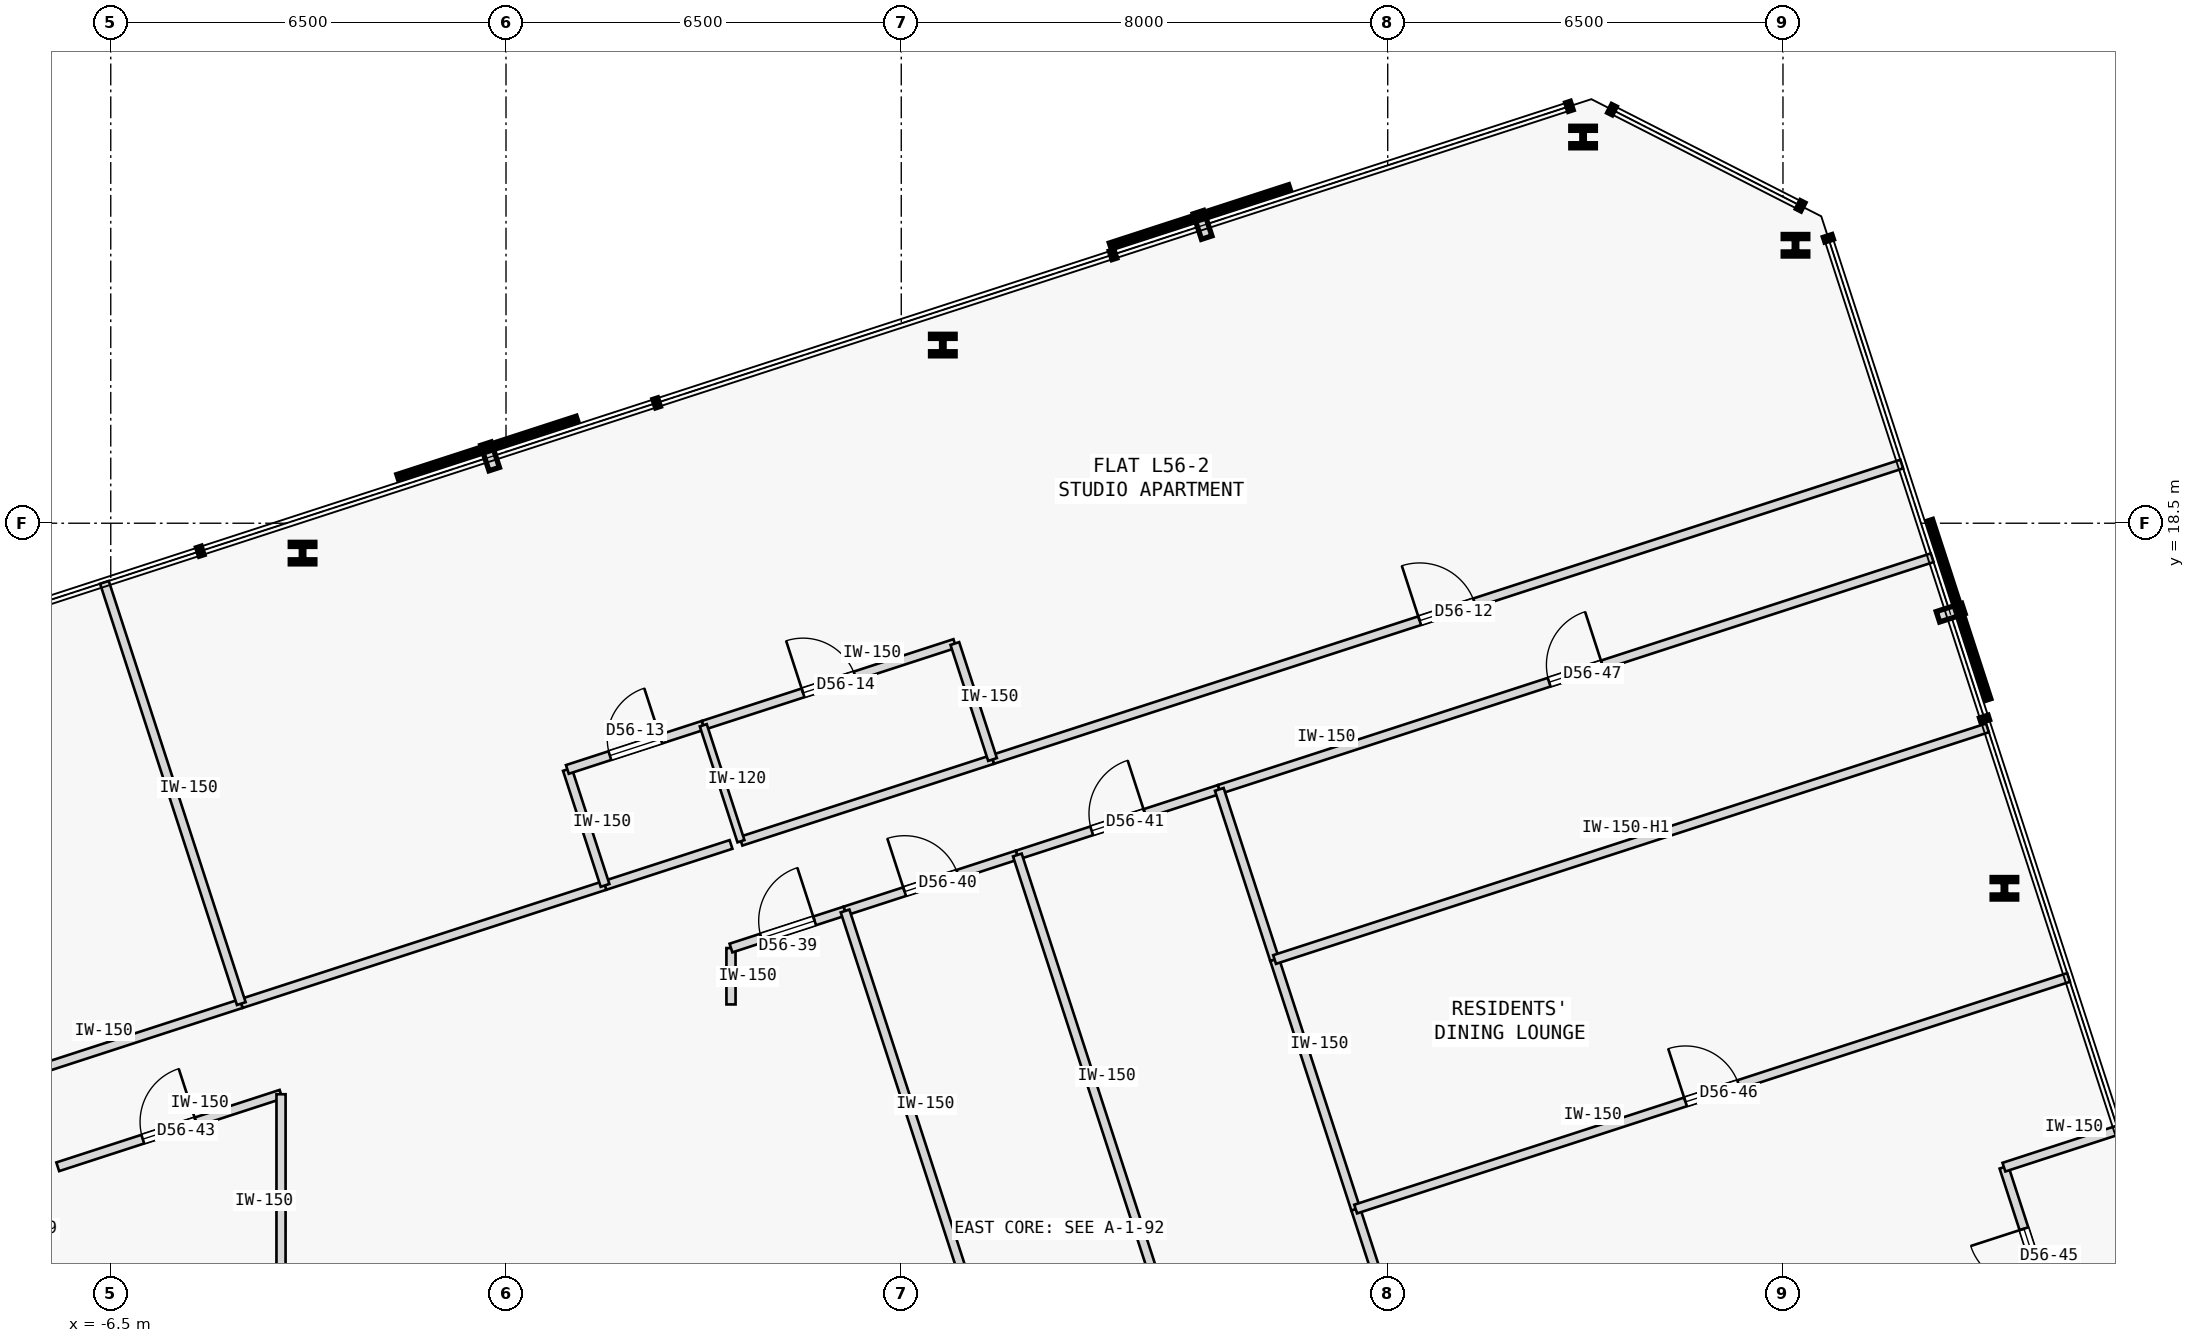
"""IFC4 building model, lengths in metres.
Left out: names, types, materials, properties, quantities, classifications, styles, units other than length and angle.
Written with IfcOpenShell. Run it as: python <this file> out.ifc"""

import sys

from ifc_helpers import new_model, si_unit, direction, frame, frame_2d, origin, origin_2d, place, context, subcontext, project, spatial, rectangle, i_section, extrude, element, fill, save


model = new_model("IFC4")
c1 = context("Model", 3, precision=1e-05, world=origin(), true_north=direction((0.0, 1.0)))
c2 = subcontext(c1, "Body", "Model", "MODEL_VIEW")
j1 = project(units=[si_unit("LENGTHUNIT", "METRE"), si_unit("PLANEANGLEUNIT", "RADIAN")], contexts=[c1])
p1 = place(None, origin())
s1 = spatial("IfcSite", under=j1, at=p1, CompositionType="ELEMENT")
p2 = place(p1, origin())
s2 = spatial("IfcBuilding", under=s1, at=p2, CompositionType="ELEMENT")
p3 = place(p2, frame((0.0, 0.0, 214.25)))
s3 = spatial("IfcBuildingStorey", under=s2, at=p3, CompositionType="ELEMENT", Elevation=214.25)
for number, where, z_axis, x_axis in (
    (1, (24.642, 12.497, 0.0), (0.0, 0.0, 1.0), (1.0, 0.0, 0.0)),
    (2, (21.206, 23.071, 0.0), (0.0, 0.0, 1.0), (1.0, 0.0, 0.0)),
    (3, (17.713, 24.851, 0.0), (0.0, 0.0, 1.0), (1.0, 0.0, 0.0)),
    (4, (7.184, 21.43, 0.0), (0.0, 0.0, 1.0), (1.0, 0.0, 0.0)),
    (5, (-3.346, 18.009, 0.0), (0.0, 0.0, 1.0), (1.0, 0.0, 0.0)),
):
    element("IfcColumn", number, at=place(p3, frame(where, z_axis=z_axis, x_axis=x_axis)), inside=s3, PredefinedType="COLUMN", context=c2, shape_type="SweptSolid", body=[
        extrude(i_section(OverallWidth=0.405, OverallDepth=0.355, WebThickness=0.042, FlangeThickness=0.068, FilletRadius=0.015, at=origin_2d()), origin(), (0.0, 0.0, 1.0), 3.35),
    ])
p4 = place(p3, frame((-22.586, 4.677, 0.0), z_axis=(0.0, 0.0, 1.0), x_axis=(0.951057743275, 0.309013218095, 0.0)))
e6 = element("IfcWall", 6, at=p4, inside=s3, PredefinedType="PARTITIONING", context=c2, shape_type="SweptSolid", body=[
    extrude(rectangle(XDim=19.171, YDim=0.15, at=frame_2d((9.585, 0.0))), origin(), (0.0, 0.0, 1.0), 3.125),
])
p5 = place(p4, frame((9.111, 0.0, 0.0)))
e7 = element("IfcOpeningElement", 7, at=p5, cuts=e6, PredefinedType="OPENING", context=c2, shape_type="SweptSolid", body=[
    extrude(rectangle(XDim=0.95, YDim=2.15, at=frame_2d((0.475, 1.075))), frame((0.0, 0.085, 0.0), z_axis=(0.0, -1.0, 0.0), x_axis=(1.0, 0.0, 0.0)), (0.0, 0.0, 1.0), 0.17),
])
p6 = place(p3, frame((-4.354, 10.601, 0.0), z_axis=(0.0, 0.0, 1.0), x_axis=(0.951050896078, 0.30903429109, 0.0)))
e8 = element("IfcWall", 8, at=p6, inside=s3, PredefinedType="PARTITIONING", context=c2, shape_type="SweptSolid", body=[
    extrude(rectangle(XDim=6.29, YDim=0.15, at=frame_2d((3.145, 0.0))), origin(), (0.0, 0.0, 1.0), 3.125),
])
p7 = place(p3, frame((8.001, 14.615, 0.0), z_axis=(0.0, 0.0, 1.0), x_axis=(0.951056661035, 0.309016548911, 0.0)))
e9 = element("IfcWall", 9, at=p7, inside=s3, PredefinedType="PARTITIONING", context=c2, shape_type="SweptSolid", body=[
    extrude(rectangle(XDim=15.722, YDim=0.15, at=frame_2d((7.861, 0.0))), origin(), (0.0, 0.0, 1.0), 3.125),
])
p8 = place(p7, frame((7.386, 0.0, 0.0)))
e10 = element("IfcOpeningElement", 10, at=p8, cuts=e9, PredefinedType="OPENING", context=c2, shape_type="SweptSolid", body=[
    extrude(rectangle(XDim=0.95, YDim=2.15, at=frame_2d((0.475, 1.075))), frame((0.0, 0.085, 0.0), z_axis=(0.0, -1.0, 0.0), x_axis=(1.0, 0.0, 0.0)), (0.0, 0.0, 1.0), 0.17),
])
p9 = place(p3, frame((1.629, 12.544, 0.0), z_axis=(0.0, 0.0, 1.0), x_axis=(0.951087596826, 0.308921321963, 0.0)))
e11 = element("IfcWall", 11, at=p9, inside=s3, PredefinedType="PARTITIONING", context=c2, shape_type="SweptSolid", body=[
    extrude(rectangle(XDim=2.178, YDim=0.15, at=frame_2d((1.089, 0.0))), origin(), (0.0, 0.0, 1.0), 3.125),
])
p10 = place(p3, frame((3.864, 13.271, 0.0), z_axis=(0.0, 0.0, 1.0), x_axis=(0.951052627573, 0.309028962374, 0.0)))
e12 = element("IfcWall", 12, at=p10, inside=s3, PredefinedType="PARTITIONING", context=c2, shape_type="SweptSolid", body=[
    extrude(rectangle(XDim=4.35, YDim=0.15, at=frame_2d((2.175, 0.0))), origin(), (0.0, 0.0, 1.0), 3.125),
])
p11 = place(p3, frame((3.7, 10.587, 0.0), z_axis=(0.0, 0.0, 1.0), x_axis=(-0.000789889169, 0.999999688038, 0.0)))
e13 = element("IfcWall", 13, at=p11, inside=s3, PredefinedType="PARTITIONING", context=c2, shape_type="SweptSolid", body=[
    extrude(rectangle(XDim=0.927, YDim=0.15, at=frame_2d((0.464, 0.0))), origin(), (0.0, 0.0, 1.0), 3.125),
])
p12 = place(p3, frame((3.699, 11.514, 0.0), z_axis=(0.0, 0.0, 1.0), x_axis=(0.951068617763, 0.308979747405, 0.0)))
e14 = element("IfcWall", 14, at=p12, inside=s3, PredefinedType="PARTITIONING", context=c2, shape_type="SweptSolid", body=[
    extrude(rectangle(XDim=1.973, YDim=0.15, at=frame_2d((0.986, 0.0))), origin(), (0.0, 0.0, 1.0), 3.125),
])
p13 = place(p12, frame((0.527, 0.0, 0.0)))
e15 = element("IfcOpeningElement", 15, at=p13, cuts=e14, PredefinedType="OPENING", context=c2, shape_type="SweptSolid", body=[
    extrude(rectangle(XDim=0.92, YDim=2.15, at=frame_2d((0.46, 1.075))), frame((0.0, 0.085, 0.0), z_axis=(0.0, -1.0, 0.0), x_axis=(1.0, 0.0, 0.0)), (0.0, 0.0, 1.0), 0.17),
])
p14 = place(p3, frame((5.576, 12.124, 0.0), z_axis=(0.0, 0.0, 1.0), x_axis=(0.951049123732, 0.309039745419, 0.0)))
e16 = element("IfcWall", 16, at=p14, inside=s3, PredefinedType="PARTITIONING", context=c2, shape_type="SweptSolid", body=[
    extrude(rectangle(XDim=2.979, YDim=0.15, at=frame_2d((1.49, 0.0))), origin(), (0.0, 0.0, 1.0), 3.125),
])
p15 = place(p14, frame((1.03, 0.0, 0.0)))
e17 = element("IfcOpeningElement", 17, at=p15, cuts=e16, PredefinedType="OPENING", context=c2, shape_type="SweptSolid", body=[
    extrude(rectangle(XDim=0.92, YDim=2.15, at=frame_2d((0.46, 1.075))), frame((0.0, 0.085, 0.0), z_axis=(0.0, -1.0, 0.0), x_axis=(1.0, 0.0, 0.0)), (0.0, 0.0, 1.0), 0.17),
])
p16 = place(p3, frame((8.409, 13.044, 0.0), z_axis=(0.0, 0.0, 1.0), x_axis=(0.951054104561, 0.309024416831, 0.0)))
e18 = element("IfcWall", 18, at=p16, inside=s3, PredefinedType="PARTITIONING", context=c2, shape_type="SweptSolid", body=[
    extrude(rectangle(XDim=3.492, YDim=0.15, at=frame_2d((1.746, 0.0))), origin(), (0.0, 0.0, 1.0), 3.125),
])
p17 = place(p16, frame((1.286, 0.0, 0.0)))
e19 = element("IfcOpeningElement", 19, at=p17, cuts=e18, PredefinedType="OPENING", context=c2, shape_type="SweptSolid", body=[
    extrude(rectangle(XDim=0.92, YDim=2.15, at=frame_2d((0.46, 1.075))), frame((0.0, 0.085, 0.0), z_axis=(0.0, -1.0, 0.0), x_axis=(1.0, 0.0, 0.0)), (0.0, 0.0, 1.0), 0.17),
])
p18 = place(p3, frame((-7.372, 7.917, 0.0), z_axis=(0.0, 0.0, 1.0), x_axis=(0.951052654993, 0.309028877989, 0.0)))
e20 = element("IfcWall", 20, at=p18, inside=s3, PredefinedType="PARTITIONING", context=c2, shape_type="SweptSolid", body=[
    extrude(rectangle(XDim=3.861, YDim=0.15, at=frame_2d((1.93, 0.0))), origin(), (0.0, 0.0, 1.0), 3.125),
])
p19 = place(p18, frame((1.47, 0.0, 0.0)))
e21 = element("IfcOpeningElement", 21, at=p19, cuts=e20, PredefinedType="OPENING", context=c2, shape_type="SweptSolid", body=[
    extrude(rectangle(XDim=0.92, YDim=2.15, at=frame_2d((0.46, 1.075))), frame((0.0, 0.085, 0.0), z_axis=(0.0, -1.0, 0.0), x_axis=(1.0, 0.0, 0.0)), (0.0, 0.0, 1.0), 0.17),
])
p20 = place(p3, frame((-3.7, 5.6, 0.0), z_axis=(0.0, 0.0, 1.0), x_axis=(0.000139120755, 0.999999990323, 0.0)))
e22 = element("IfcWall", 22, at=p20, inside=s3, PredefinedType="PARTITIONING", context=c2, shape_type="SweptSolid", body=[
    extrude(rectangle(XDim=3.51, YDim=0.15, at=frame_2d((1.755, 0.0))), origin(), (0.0, 0.0, 1.0), 3.125),
])
p21 = place(p3, frame((25.576, 5.011, 0.0), z_axis=(0.0, 0.0, 1.0), x_axis=(-0.309011835091, 0.951058192633, 0.0)))
e23 = element("IfcWall", 23, at=p21, inside=s3, PredefinedType="PARTITIONING", context=c2, shape_type="SweptSolid", body=[
    extrude(rectangle(XDim=3.049, YDim=0.15, at=frame_2d((1.524, 0.0))), origin(), (0.0, 0.0, 1.0), 3.125),
])
p22 = place(p21, frame((1.064, 0.0, 0.0)))
e24 = element("IfcOpeningElement", 24, at=p22, cuts=e23, PredefinedType="OPENING", context=c2, shape_type="SweptSolid", body=[
    extrude(rectangle(XDim=0.92, YDim=2.15, at=frame_2d((0.46, 1.075))), frame((0.0, 0.085, 0.0), z_axis=(0.0, -1.0, 0.0), x_axis=(1.0, 0.0, 0.0)), (0.0, 0.0, 1.0), 0.17),
])
p23 = place(p3, frame((24.634, 7.91, 0.0), z_axis=(0.0, 0.0, 1.0), x_axis=(0.951054051148, 0.309024581215, 0.0)))
e25 = element("IfcWall", 25, at=p23, inside=s3, PredefinedType="PARTITIONING", context=c2, shape_type="SweptSolid", body=[
    extrude(rectangle(XDim=1.975, YDim=0.15, at=frame_2d((0.988, 0.0))), origin(), (0.0, 0.0, 1.0), 3.125),
])
p24 = place(p3, frame((11.73, 14.123, 0.0), z_axis=(0.0, 0.0, 1.0), x_axis=(0.951060263663, 0.309005460926, 0.0)))
e26 = element("IfcWall", 26, at=p24, inside=s3, PredefinedType="PARTITIONING", context=c2, shape_type="SweptSolid", body=[
    extrude(rectangle(XDim=12.327, YDim=0.15, at=frame_2d((6.164, 0.0))), origin(), (0.0, 0.0, 1.0), 3.125),
])
p25 = place(p24, frame((5.704, 0.0, 0.0)))
e27 = element("IfcOpeningElement", 27, at=p25, cuts=e26, PredefinedType="OPENING", context=c2, shape_type="SweptSolid", body=[
    extrude(rectangle(XDim=0.92, YDim=2.15, at=frame_2d((0.46, 1.075))), frame((0.0, 0.085, 0.0), z_axis=(0.0, -1.0, 0.0), x_axis=(1.0, 0.0, 0.0)), (0.0, 0.0, 1.0), 0.17),
])
p26 = place(p3, frame((-4.354, 10.601, 0.0), z_axis=(0.0, 0.0, 1.0), x_axis=(-0.308989064099, 0.951065590939, 0.0)))
e28 = element("IfcWall", 28, at=p26, inside=s3, PredefinedType="PARTITIONING", context=c2, shape_type="SweptSolid", body=[
    extrude(rectangle(XDim=7.284, YDim=0.15, at=frame_2d((3.642, 0.0))), origin(), (0.0, 0.0, 1.0), 3.125),
])
p27 = place(p3, frame((1.629, 12.544, 0.0), z_axis=(0.0, 0.0, 1.0), x_axis=(-0.309022749039, 0.951054646472, 0.0)))
e29 = element("IfcWall", 29, at=p27, inside=s3, PredefinedType="PARTITIONING", context=c2, shape_type="SweptSolid", body=[
    extrude(rectangle(XDim=2.005, YDim=0.15, at=frame_2d((1.002, 0.0))), origin(), (0.0, 0.0, 1.0), 3.125),
])
p28 = place(p3, frame((1.009, 14.451, 0.0), z_axis=(0.0, 0.0, 1.0), x_axis=(0.951076048914, 0.308956872689, 0.0)))
e30 = element("IfcWall", 30, at=p28, inside=s3, PredefinedType="PARTITIONING", context=c2, shape_type="SweptSolid", body=[
    extrude(rectangle(XDim=2.35, YDim=0.15, at=frame_2d((1.175, 0.0))), origin(), (0.0, 0.0, 1.0), 3.125),
])
p29 = place(p28, frame((0.735, 0.0, 0.0)))
e31 = element("IfcOpeningElement", 31, at=p29, cuts=e30, PredefinedType="OPENING", context=c2, shape_type="SweptSolid", body=[
    extrude(rectangle(XDim=0.88, YDim=2.15, at=frame_2d((0.44, 1.075))), frame((0.0, 0.085, 0.0), z_axis=(0.0, -1.0, 0.0), x_axis=(1.0, 0.0, 0.0)), (0.0, 0.0, 1.0), 0.17),
])
p30 = place(p3, frame((3.244, 15.177, 0.0), z_axis=(0.0, 0.0, 1.0), x_axis=(0.951052627573, 0.309028962374, 0.0)))
e32 = element("IfcWall", 32, at=p30, inside=s3, PredefinedType="PARTITIONING", context=c2, shape_type="SweptSolid", body=[
    extrude(rectangle(XDim=4.35, YDim=0.15, at=frame_2d((2.175, 0.0))), origin(), (0.0, 0.0, 1.0), 3.125),
])
p31 = place(p30, frame((1.725, 0.0, 0.0)))
e33 = element("IfcOpeningElement", 33, at=p31, cuts=e32, PredefinedType="OPENING", context=c2, shape_type="SweptSolid", body=[
    extrude(rectangle(XDim=0.9, YDim=2.15, at=frame_2d((0.45, 1.075))), frame((0.0, 0.085, 0.0), z_axis=(0.0, -1.0, 0.0), x_axis=(1.0, 0.0, 0.0)), (0.0, 0.0, 1.0), 0.17),
])
p32 = place(p3, frame((8.001, 14.615, 0.0), z_axis=(0.0, 0.0, 1.0), x_axis=(-0.309022749039, 0.951054646472, 0.0)))
e34 = element("IfcWall", 34, at=p32, inside=s3, PredefinedType="PARTITIONING", context=c2, shape_type="SweptSolid", body=[
    extrude(rectangle(XDim=2.005, YDim=0.15, at=frame_2d((1.002, 0.0))), origin(), (0.0, 0.0, 1.0), 3.125),
])
p33 = place(p3, frame((3.864, 13.271, 0.0), z_axis=(0.0, 0.0, 1.0), x_axis=(-0.309022749039, 0.951054646472, 0.0)))
e35 = element("IfcWall", 35, at=p33, inside=s3, PredefinedType="PARTITIONING", context=c2, shape_type="SweptSolid", body=[
    extrude(rectangle(XDim=2.005, YDim=0.12, at=frame_2d((1.002, 0.0))), origin(), (0.0, 0.0, 1.0), 3.125),
])
p34 = place(p3, frame((7.696, 5.599, 0.0), z_axis=(0.0, 0.0, 1.0), x_axis=(-0.309022497646, 0.951054728157, 0.0)))
e36 = element("IfcWall", 36, at=p34, inside=s3, PredefinedType="PARTITIONING", context=c2, shape_type="SweptSolid", body=[
    extrude(rectangle(XDim=6.86, YDim=0.15, at=frame_2d((3.43, 0.0))), origin(), (0.0, 0.0, 1.0), 3.125),
])
p35 = place(p3, frame((10.828, 5.6, 0.0), z_axis=(0.0, 0.0, 1.0), x_axis=(-0.30901342663, 0.951057675519, 0.0)))
e37 = element("IfcWall", 37, at=p35, inside=s3, PredefinedType="PARTITIONING", context=c2, shape_type="SweptSolid", body=[
    extrude(rectangle(XDim=7.827, YDim=0.15, at=frame_2d((3.914, 0.0))), origin(), (0.0, 0.0, 1.0), 3.125),
])
p36 = place(p3, frame((14.5, 5.6, 0.0), z_axis=(0.0, 0.0, 1.0), x_axis=(-0.308872364299, 0.951103497298, 0.0)))
e38 = element("IfcWall", 38, at=p36, inside=s3, PredefinedType="PARTITIONING", context=c2, shape_type="SweptSolid", body=[
    extrude(rectangle(XDim=1.705, YDim=0.15, at=frame_2d((0.853, 0.0))), origin(), (0.0, 0.0, 1.0), 3.125),
])
p37 = place(p3, frame((13.973, 7.221, 0.0), z_axis=(0.0, 0.0, 1.0), x_axis=(-0.309038735568, 0.951049451879, 0.0)))
e39 = element("IfcWall", 39, at=p37, inside=s3, PredefinedType="PARTITIONING", context=c2, shape_type="SweptSolid", body=[
    extrude(rectangle(XDim=4.315, YDim=0.15, at=frame_2d((2.157, 0.0))), origin(), (0.0, 0.0, 1.0), 3.125),
])
p38 = place(p3, frame((12.639, 11.325, 0.0), z_axis=(0.0, 0.0, 1.0), x_axis=(-0.309024151982, 0.951054190618, 0.0)))
e40 = element("IfcWall", 40, at=p38, inside=s3, PredefinedType="PARTITIONING", context=c2, shape_type="SweptSolid", body=[
    extrude(rectangle(XDim=2.942, YDim=0.15, at=frame_2d((1.471, 0.0))), origin(), (0.0, 0.0, 1.0), 3.125),
])
p39 = place(p3, frame((13.973, 7.221, 0.0), z_axis=(0.0, 0.0, 1.0), x_axis=(0.951058372493, 0.309011281527, 0.0)))
e41 = element("IfcWall", 41, at=p39, inside=s3, PredefinedType="PARTITIONING", context=c2, shape_type="SweptSolid", body=[
    extrude(rectangle(XDim=12.327, YDim=0.15, at=frame_2d((6.163, 0.0))), origin(), (0.0, 0.0, 1.0), 3.125),
])
p40 = place(p39, frame((5.704, 0.0, 0.0)))
e42 = element("IfcOpeningElement", 42, at=p40, cuts=e41, PredefinedType="OPENING", context=c2, shape_type="SweptSolid", body=[
    extrude(rectangle(XDim=0.92, YDim=2.15, at=frame_2d((0.46, 1.075))), frame((0.0, 0.085, 0.0), z_axis=(0.0, -1.0, 0.0), x_axis=(1.0, 0.0, 0.0)), (0.0, 0.0, 1.0), 0.17),
])
p41 = place(p3, frame((12.639, 11.325, 0.0), z_axis=(0.0, 0.0, 1.0), x_axis=(0.951054443032, 0.309023375149, 0.0)))
e43 = element("IfcWall", 43, at=p41, inside=s3, PredefinedType="PARTITIONING", context=c2, shape_type="SweptSolid", body=[
    extrude(rectangle(XDim=12.327, YDim=0.15, at=frame_2d((6.164, 0.0))), origin(), (0.0, 0.0, 1.0), 2.675),
])
p42 = place(p8, origin())
e44 = element("IfcDoor", 44, at=p42, inside=s3, OperationType="SINGLE_SWING_LEFT", PredefinedType="DOOR", context=c2, shape_type="SweptSolid", body=[
    extrude(rectangle(XDim=0.95, YDim=2.15, at=frame_2d((0.475, 1.075))), frame((0.0, 0.025, 0.0), z_axis=(0.0, -1.0, 0.0), x_axis=(1.0, 0.0, 0.0)), (0.0, 0.0, 1.0), 0.05),
])
fill(e10, e44)
p43 = place(p29, origin())
e45 = element("IfcDoor", 45, at=p43, inside=s3, OperationType="SINGLE_SWING_RIGHT", PredefinedType="DOOR", context=c2, shape_type="SweptSolid", body=[
    extrude(rectangle(XDim=0.88, YDim=2.15, at=frame_2d((0.44, 1.075))), frame((0.0, 0.025, 0.0), z_axis=(0.0, -1.0, 0.0), x_axis=(1.0, 0.0, 0.0)), (0.0, 0.0, 1.0), 0.05),
])
fill(e31, e45)
p44 = place(p31, origin())
e46 = element("IfcDoor", 46, at=p44, inside=s3, OperationType="SINGLE_SWING_LEFT", PredefinedType="DOOR", context=c2, shape_type="SweptSolid", body=[
    extrude(rectangle(XDim=0.9, YDim=2.15, at=frame_2d((0.45, 1.075))), frame((0.0, 0.025, 0.0), z_axis=(0.0, -1.0, 0.0), x_axis=(1.0, 0.0, 0.0)), (0.0, 0.0, 1.0), 0.05),
])
fill(e33, e46)
p45 = place(p13, origin())
e47 = element("IfcDoor", 47, at=p45, inside=s3, OperationType="SINGLE_SWING_RIGHT", PredefinedType="DOOR", context=c2, shape_type="SweptSolid", body=[
    extrude(rectangle(XDim=0.92, YDim=2.15, at=frame_2d((0.46, 1.075))), frame((0.0, 0.025, 0.0), z_axis=(0.0, -1.0, 0.0), x_axis=(1.0, 0.0, 0.0)), (0.0, 0.0, 1.0), 0.05),
])
fill(e15, e47)
p46 = place(p15, origin())
e48 = element("IfcDoor", 48, at=p46, inside=s3, OperationType="SINGLE_SWING_LEFT", PredefinedType="DOOR", context=c2, shape_type="SweptSolid", body=[
    extrude(rectangle(XDim=0.92, YDim=2.15, at=frame_2d((0.46, 1.075))), frame((0.0, 0.025, 0.0), z_axis=(0.0, -1.0, 0.0), x_axis=(1.0, 0.0, 0.0)), (0.0, 0.0, 1.0), 0.05),
])
fill(e17, e48)
p47 = place(p17, origin())
e49 = element("IfcDoor", 49, at=p47, inside=s3, OperationType="SINGLE_SWING_RIGHT", PredefinedType="DOOR", context=c2, shape_type="SweptSolid", body=[
    extrude(rectangle(XDim=0.92, YDim=2.15, at=frame_2d((0.46, 1.075))), frame((0.0, 0.025, 0.0), z_axis=(0.0, -1.0, 0.0), x_axis=(1.0, 0.0, 0.0)), (0.0, 0.0, 1.0), 0.05),
])
fill(e19, e49)
p48 = place(p19, origin())
e50 = element("IfcDoor", 50, at=p48, inside=s3, OperationType="SINGLE_SWING_RIGHT", PredefinedType="DOOR", context=c2, shape_type="SweptSolid", body=[
    extrude(rectangle(XDim=0.92, YDim=2.15, at=frame_2d((0.46, 1.075))), frame((0.0, 0.025, 0.0), z_axis=(0.0, -1.0, 0.0), x_axis=(1.0, 0.0, 0.0)), (0.0, 0.0, 1.0), 0.05),
])
fill(e21, e50)
p49 = place(p22, origin())
e51 = element("IfcDoor", 51, at=p49, inside=s3, OperationType="SINGLE_SWING_RIGHT", PredefinedType="DOOR", context=c2, shape_type="SweptSolid", body=[
    extrude(rectangle(XDim=0.92, YDim=2.15, at=frame_2d((0.46, 1.075))), frame((0.0, 0.025, 0.0), z_axis=(0.0, -1.0, 0.0), x_axis=(1.0, 0.0, 0.0)), (0.0, 0.0, 1.0), 0.05),
])
fill(e24, e51)
p50 = place(p40, origin())
e52 = element("IfcDoor", 52, at=p50, inside=s3, OperationType="SINGLE_SWING_LEFT", PredefinedType="DOOR", context=c2, shape_type="SweptSolid", body=[
    extrude(rectangle(XDim=0.92, YDim=2.15, at=frame_2d((0.46, 1.075))), frame((0.0, 0.025, 0.0), z_axis=(0.0, -1.0, 0.0), x_axis=(1.0, 0.0, 0.0)), (0.0, 0.0, 1.0), 0.05),
])
fill(e42, e52)
p51 = place(p25, origin())
e53 = element("IfcDoor", 53, at=p51, inside=s3, OperationType="SINGLE_SWING_RIGHT", PredefinedType="DOOR", context=c2, shape_type="SweptSolid", body=[
    extrude(rectangle(XDim=0.92, YDim=2.15, at=frame_2d((0.46, 1.075))), frame((0.0, 0.025, 0.0), z_axis=(0.0, -1.0, 0.0), x_axis=(1.0, 0.0, 0.0)), (0.0, 0.0, 1.0), 0.05),
])
fill(e27, e53)
save(model, sys.argv[1])
